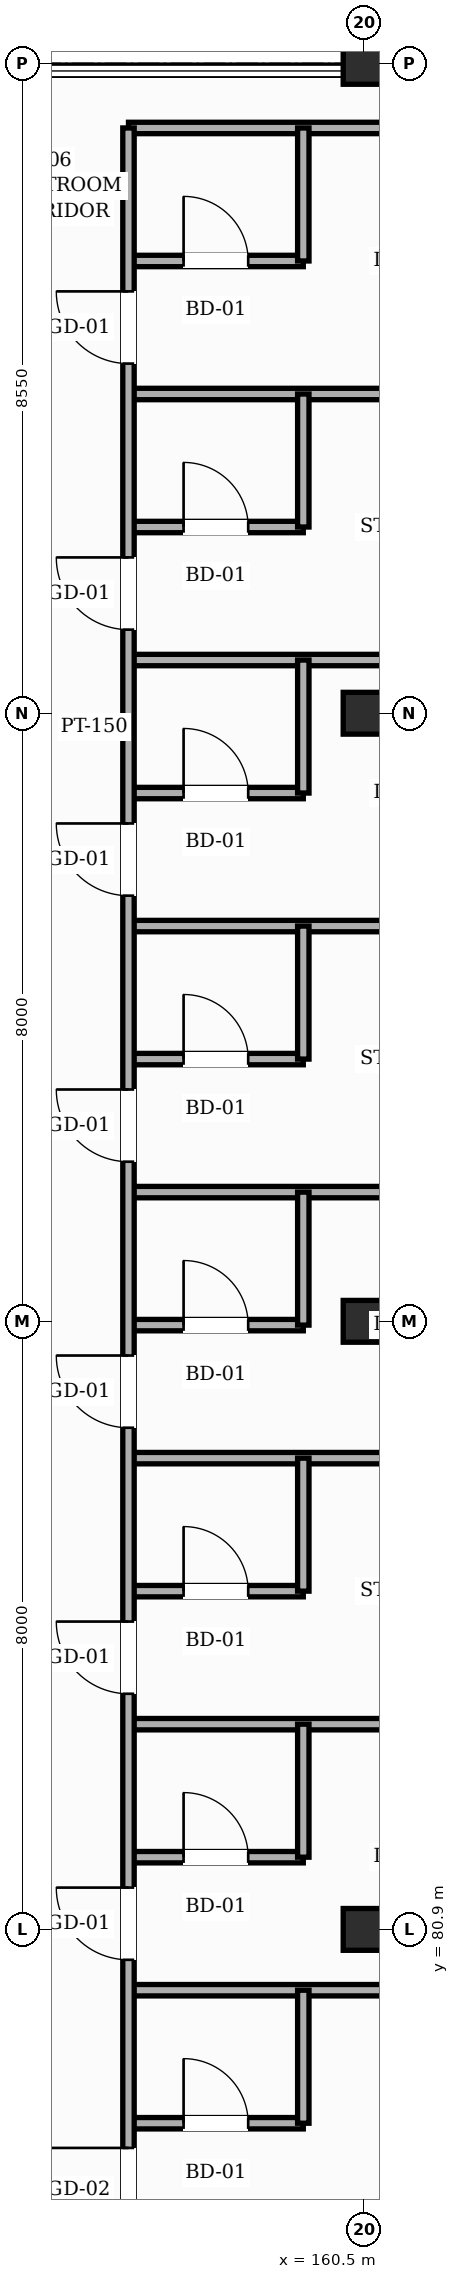
"""IFC4 building model, lengths in metres.
Left out: names, types, materials, properties, quantities, classifications, styles, units other than length and angle.
Written with IfcOpenShell. Run it as: python <this file> out.ifc"""

import sys

from ifc_helpers import new_model, si_unit, direction, frame, frame_2d, origin, origin_2d, place, context, subcontext, project, spatial, rectangle, hollow_rectangle, extrude, element, fill, save


model = new_model("IFC4")
c1 = context("Model", 3, precision=1e-05, world=origin(), true_north=direction((0.0, 1.0)))
c2 = subcontext(c1, "Body", "Model", "MODEL_VIEW")
j1 = project(units=[si_unit("LENGTHUNIT", "METRE"), si_unit("PLANEANGLEUNIT", "RADIAN")], contexts=[c1])
p1 = place(None, origin())
s1 = spatial("IfcSite", under=j1, at=p1, CompositionType="ELEMENT")
p2 = place(p1, origin())
s2 = spatial("IfcBuilding", under=s1, at=p2, CompositionType="ELEMENT")
p3 = place(p2, frame((0.0, 0.0, 28.2)))
s3 = spatial("IfcBuildingStorey", under=s2, at=p3, CompositionType="ELEMENT", Elevation=28.2)
for number, where, z_axis, x_axis in (
    (1, (160.5, 80.9, 0.0), (0.0, 0.0, 1.0), (1.0, 0.0, 0.0)),
    (2, (160.5, 88.9, 0.0), (0.0, 0.0, 1.0), (1.0, 0.0, 0.0)),
    (3, (160.5, 96.9, 0.0), (0.0, 0.0, 1.0), (1.0, 0.0, 0.0)),
):
    element("IfcColumn", number, at=place(p3, frame(where, z_axis=z_axis, x_axis=x_axis)), inside=s3, PredefinedType="COLUMN", context=c2, shape_type="SweptSolid", body=[
        extrude(hollow_rectangle(XDim=0.55, YDim=0.55, WallThickness=0.022, InnerFilletRadius=0.022, OuterFilletRadius=0.044, at=origin_2d()), origin(), (0.0, 0.0, 1.0), 3.6),
    ])
p4 = place(p3, frame((160.5, 105.45, 0.0), z_axis=(0.0, 0.0, 1.0), x_axis=(1.0, 0.0, 0.0)))
e4 = element("IfcColumn", 4, at=p4, inside=s3, PredefinedType="COLUMN", context=c2, shape_type="SweptSolid", body=[
    extrude(hollow_rectangle(XDim=0.55, YDim=0.55, WallThickness=0.022, InnerFilletRadius=0.022, OuterFilletRadius=0.044, at=origin_2d()), origin(), (0.0, 0.0, 1.0), 3.38),
])
p5 = place(p3, frame((157.4, 78.35, 0.0), z_axis=(0.0, 0.0, 1.0), x_axis=(1.0, 0.0, 0.0)))
e5 = element("IfcWall", 5, at=p5, inside=s3, PredefinedType="PARTITIONING", context=c2, shape_type="SweptSolid", body=[
    extrude(rectangle(XDim=2.3, YDim=0.15, at=frame_2d((1.15, 0.0))), origin(), (0.0, 0.0, 1.0), 3.365),
])
p6 = place(p5, frame((0.725, 0.0, 0.0)))
e6 = element("IfcOpeningElement", 6, at=p6, cuts=e5, PredefinedType="OPENING", context=c2, shape_type="SweptSolid", body=[
    extrude(rectangle(XDim=0.85, YDim=2.1, at=frame_2d((0.425, 1.05))), frame((0.0, 0.085, 0.0), z_axis=(0.0, -1.0, 0.0), x_axis=(1.0, 0.0, 0.0)), (0.0, 0.0, 1.0), 0.17),
])
p7 = place(p3, frame((157.4, 80.1, 0.0), z_axis=(0.0, 0.0, 1.0), x_axis=(1.0, 0.0, 0.0)))
e7 = element("IfcWall", 7, at=p7, inside=s3, PredefinedType="PARTITIONING", context=c2, shape_type="SweptSolid", body=[
    extrude(rectangle(XDim=9.8, YDim=0.15, at=frame_2d((4.9, 0.0))), origin(), (0.0, 0.0, 1.0), 3.365),
])
p8 = place(p3, frame((157.4, 81.85, 0.0), z_axis=(0.0, 0.0, 1.0), x_axis=(1.0, 0.0, 0.0)))
e8 = element("IfcWall", 8, at=p8, inside=s3, PredefinedType="PARTITIONING", context=c2, shape_type="SweptSolid", body=[
    extrude(rectangle(XDim=2.3, YDim=0.15, at=frame_2d((1.15, 0.0))), origin(), (0.0, 0.0, 1.0), 3.365),
])
p9 = place(p8, frame((0.725, 0.0, 0.0)))
e9 = element("IfcOpeningElement", 9, at=p9, cuts=e8, PredefinedType="OPENING", context=c2, shape_type="SweptSolid", body=[
    extrude(rectangle(XDim=0.85, YDim=2.1, at=frame_2d((0.425, 1.05))), frame((0.0, 0.085, 0.0), z_axis=(0.0, -1.0, 0.0), x_axis=(1.0, 0.0, 0.0)), (0.0, 0.0, 1.0), 0.17),
])
p10 = place(p3, frame((157.4, 83.6, 0.0), z_axis=(0.0, 0.0, 1.0), x_axis=(1.0, 0.0, 0.0)))
e10 = element("IfcWall", 10, at=p10, inside=s3, PredefinedType="PARTITIONING", context=c2, shape_type="SweptSolid", body=[
    extrude(rectangle(XDim=9.8, YDim=0.15, at=frame_2d((4.9, 0.0))), origin(), (0.0, 0.0, 1.0), 3.365),
])
p11 = place(p3, frame((157.4, 85.35, 0.0), z_axis=(0.0, 0.0, 1.0), x_axis=(1.0, 0.0, 0.0)))
e11 = element("IfcWall", 11, at=p11, inside=s3, PredefinedType="PARTITIONING", context=c2, shape_type="SweptSolid", body=[
    extrude(rectangle(XDim=2.3, YDim=0.15, at=frame_2d((1.15, 0.0))), origin(), (0.0, 0.0, 1.0), 3.365),
])
p12 = place(p11, frame((0.725, 0.0, 0.0)))
e12 = element("IfcOpeningElement", 12, at=p12, cuts=e11, PredefinedType="OPENING", context=c2, shape_type="SweptSolid", body=[
    extrude(rectangle(XDim=0.85, YDim=2.1, at=frame_2d((0.425, 1.05))), frame((0.0, 0.085, 0.0), z_axis=(0.0, -1.0, 0.0), x_axis=(1.0, 0.0, 0.0)), (0.0, 0.0, 1.0), 0.17),
])
p13 = place(p3, frame((157.4, 87.1, 0.0), z_axis=(0.0, 0.0, 1.0), x_axis=(1.0, 0.0, 0.0)))
e13 = element("IfcWall", 13, at=p13, inside=s3, PredefinedType="PARTITIONING", context=c2, shape_type="SweptSolid", body=[
    extrude(rectangle(XDim=9.8, YDim=0.15, at=frame_2d((4.9, 0.0))), origin(), (0.0, 0.0, 1.0), 3.365),
])
p14 = place(p3, frame((157.4, 88.85, 0.0), z_axis=(0.0, 0.0, 1.0), x_axis=(1.0, 0.0, 0.0)))
e14 = element("IfcWall", 14, at=p14, inside=s3, PredefinedType="PARTITIONING", context=c2, shape_type="SweptSolid", body=[
    extrude(rectangle(XDim=2.3, YDim=0.15, at=frame_2d((1.15, 0.0))), origin(), (0.0, 0.0, 1.0), 2.805),
])
p15 = place(p14, frame((0.725, 0.0, 0.0)))
e15 = element("IfcOpeningElement", 15, at=p15, cuts=e14, PredefinedType="OPENING", context=c2, shape_type="SweptSolid", body=[
    extrude(rectangle(XDim=0.85, YDim=2.1, at=frame_2d((0.425, 1.05))), frame((0.0, 0.085, 0.0), z_axis=(0.0, -1.0, 0.0), x_axis=(1.0, 0.0, 0.0)), (0.0, 0.0, 1.0), 0.17),
])
p16 = place(p3, frame((157.4, 90.6, 0.0), z_axis=(0.0, 0.0, 1.0), x_axis=(1.0, 0.0, 0.0)))
e16 = element("IfcWall", 16, at=p16, inside=s3, PredefinedType="PARTITIONING", context=c2, shape_type="SweptSolid", body=[
    extrude(rectangle(XDim=9.8, YDim=0.15, at=frame_2d((4.9, 0.0))), origin(), (0.0, 0.0, 1.0), 3.365),
])
p17 = place(p3, frame((157.4, 92.35, 0.0), z_axis=(0.0, 0.0, 1.0), x_axis=(1.0, 0.0, 0.0)))
e17 = element("IfcWall", 17, at=p17, inside=s3, PredefinedType="PARTITIONING", context=c2, shape_type="SweptSolid", body=[
    extrude(rectangle(XDim=2.3, YDim=0.15, at=frame_2d((1.15, 0.0))), origin(), (0.0, 0.0, 1.0), 3.365),
])
p18 = place(p17, frame((0.725, 0.0, 0.0)))
e18 = element("IfcOpeningElement", 18, at=p18, cuts=e17, PredefinedType="OPENING", context=c2, shape_type="SweptSolid", body=[
    extrude(rectangle(XDim=0.85, YDim=2.1, at=frame_2d((0.425, 1.05))), frame((0.0, 0.085, 0.0), z_axis=(0.0, -1.0, 0.0), x_axis=(1.0, 0.0, 0.0)), (0.0, 0.0, 1.0), 0.17),
])
p19 = place(p3, frame((157.4, 94.1, 0.0), z_axis=(0.0, 0.0, 1.0), x_axis=(1.0, 0.0, 0.0)))
e19 = element("IfcWall", 19, at=p19, inside=s3, PredefinedType="PARTITIONING", context=c2, shape_type="SweptSolid", body=[
    extrude(rectangle(XDim=9.8, YDim=0.15, at=frame_2d((4.9, 0.0))), origin(), (0.0, 0.0, 1.0), 3.365),
])
p20 = place(p3, frame((157.4, 95.85, 0.0), z_axis=(0.0, 0.0, 1.0), x_axis=(1.0, 0.0, 0.0)))
e20 = element("IfcWall", 20, at=p20, inside=s3, PredefinedType="PARTITIONING", context=c2, shape_type="SweptSolid", body=[
    extrude(rectangle(XDim=2.3, YDim=0.15, at=frame_2d((1.15, 0.0))), origin(), (0.0, 0.0, 1.0), 3.365),
])
p21 = place(p20, frame((0.725, 0.0, 0.0)))
e21 = element("IfcOpeningElement", 21, at=p21, cuts=e20, PredefinedType="OPENING", context=c2, shape_type="SweptSolid", body=[
    extrude(rectangle(XDim=0.85, YDim=2.1, at=frame_2d((0.425, 1.05))), frame((0.0, 0.085, 0.0), z_axis=(0.0, -1.0, 0.0), x_axis=(1.0, 0.0, 0.0)), (0.0, 0.0, 1.0), 0.17),
])
p22 = place(p3, frame((157.4, 97.6, 0.0), z_axis=(0.0, 0.0, 1.0), x_axis=(1.0, 0.0, 0.0)))
e22 = element("IfcWall", 22, at=p22, inside=s3, PredefinedType="PARTITIONING", context=c2, shape_type="SweptSolid", body=[
    extrude(rectangle(XDim=9.8, YDim=0.15, at=frame_2d((4.9, 0.0))), origin(), (0.0, 0.0, 1.0), 3.365),
])
p23 = place(p3, frame((157.4, 99.35, 0.0), z_axis=(0.0, 0.0, 1.0), x_axis=(1.0, 0.0, 0.0)))
e23 = element("IfcWall", 23, at=p23, inside=s3, PredefinedType="PARTITIONING", context=c2, shape_type="SweptSolid", body=[
    extrude(rectangle(XDim=2.3, YDim=0.15, at=frame_2d((1.15, 0.0))), origin(), (0.0, 0.0, 1.0), 3.365),
])
p24 = place(p23, frame((0.725, 0.0, 0.0)))
e24 = element("IfcOpeningElement", 24, at=p24, cuts=e23, PredefinedType="OPENING", context=c2, shape_type="SweptSolid", body=[
    extrude(rectangle(XDim=0.85, YDim=2.1, at=frame_2d((0.425, 1.05))), frame((0.0, 0.085, 0.0), z_axis=(0.0, -1.0, 0.0), x_axis=(1.0, 0.0, 0.0)), (0.0, 0.0, 1.0), 0.17),
])
p25 = place(p3, frame((157.4, 101.1, 0.0), z_axis=(0.0, 0.0, 1.0), x_axis=(1.0, 0.0, 0.0)))
e25 = element("IfcWall", 25, at=p25, inside=s3, PredefinedType="PARTITIONING", context=c2, shape_type="SweptSolid", body=[
    extrude(rectangle(XDim=9.8, YDim=0.15, at=frame_2d((4.9, 0.0))), origin(), (0.0, 0.0, 1.0), 3.005),
])
p26 = place(p3, frame((157.4, 102.85, 0.0), z_axis=(0.0, 0.0, 1.0), x_axis=(1.0, 0.0, 0.0)))
e26 = element("IfcWall", 26, at=p26, inside=s3, PredefinedType="PARTITIONING", context=c2, shape_type="SweptSolid", body=[
    extrude(rectangle(XDim=2.3, YDim=0.15, at=frame_2d((1.15, 0.0))), origin(), (0.0, 0.0, 1.0), 3.365),
])
p27 = place(p26, frame((0.725, 0.0, 0.0)))
e27 = element("IfcOpeningElement", 27, at=p27, cuts=e26, PredefinedType="OPENING", context=c2, shape_type="SweptSolid", body=[
    extrude(rectangle(XDim=0.85, YDim=2.1, at=frame_2d((0.425, 1.05))), frame((0.0, 0.085, 0.0), z_axis=(0.0, -1.0, 0.0), x_axis=(1.0, 0.0, 0.0)), (0.0, 0.0, 1.0), 0.17),
])
p28 = place(p3, frame((157.4, 104.6, 0.0), z_axis=(0.0, 0.0, 1.0), x_axis=(1.0, 0.0, 0.0)))
e28 = element("IfcWall", 28, at=p28, inside=s3, PredefinedType="PARTITIONING", context=c2, shape_type="SweptSolid", body=[
    extrude(rectangle(XDim=9.8, YDim=0.15, at=frame_2d((4.9, 0.0))), origin(), (0.0, 0.0, 1.0), 3.365),
])
p29 = place(p3, frame((157.4, 76.6, 0.0), z_axis=(0.0, 0.0, 1.0), x_axis=(0.0, 1.0, 0.0)))
e29 = element("IfcWall", 29, at=p29, inside=s3, PredefinedType="PARTITIONING", context=c2, shape_type="SweptSolid", body=[
    extrude(rectangle(XDim=28.0, YDim=0.15, at=frame_2d((14.0, 0.0))), origin(), (0.0, 0.0, 1.0), 3.365),
])
p30 = place(p29, frame((0.325, 0.0, 0.0)))
e30 = element("IfcOpeningElement", 30, at=p30, cuts=e29, PredefinedType="OPENING", context=c2, shape_type="SweptSolid", body=[
    extrude(rectangle(XDim=1.1, YDim=2.2, at=frame_2d((0.55, 1.1))), frame((0.0, 0.085, 0.0), z_axis=(0.0, -1.0, 0.0), x_axis=(1.0, 0.0, 0.0)), (0.0, 0.0, 1.0), 0.17),
])
p31 = place(p29, frame((3.9, 0.0, 0.0)))
e31 = element("IfcOpeningElement", 31, at=p31, cuts=e29, PredefinedType="OPENING", context=c2, shape_type="SweptSolid", body=[
    extrude(rectangle(XDim=0.95, YDim=2.15, at=frame_2d((0.475, 1.075))), frame((0.0, 0.085, 0.0), z_axis=(0.0, -1.0, 0.0), x_axis=(1.0, 0.0, 0.0)), (0.0, 0.0, 1.0), 0.17),
])
p32 = place(p29, frame((7.4, 0.0, 0.0)))
e32 = element("IfcOpeningElement", 32, at=p32, cuts=e29, PredefinedType="OPENING", context=c2, shape_type="SweptSolid", body=[
    extrude(rectangle(XDim=0.95, YDim=2.15, at=frame_2d((0.475, 1.075))), frame((0.0, 0.085, 0.0), z_axis=(0.0, -1.0, 0.0), x_axis=(1.0, 0.0, 0.0)), (0.0, 0.0, 1.0), 0.17),
])
p33 = place(p29, frame((10.9, 0.0, 0.0)))
e33 = element("IfcOpeningElement", 33, at=p33, cuts=e29, PredefinedType="OPENING", context=c2, shape_type="SweptSolid", body=[
    extrude(rectangle(XDim=0.95, YDim=2.15, at=frame_2d((0.475, 1.075))), frame((0.0, 0.085, 0.0), z_axis=(0.0, -1.0, 0.0), x_axis=(1.0, 0.0, 0.0)), (0.0, 0.0, 1.0), 0.17),
])
p34 = place(p29, frame((14.4, 0.0, 0.0)))
e34 = element("IfcOpeningElement", 34, at=p34, cuts=e29, PredefinedType="OPENING", context=c2, shape_type="SweptSolid", body=[
    extrude(rectangle(XDim=0.95, YDim=2.15, at=frame_2d((0.475, 1.075))), frame((0.0, 0.085, 0.0), z_axis=(0.0, -1.0, 0.0), x_axis=(1.0, 0.0, 0.0)), (0.0, 0.0, 1.0), 0.17),
])
p35 = place(p29, frame((17.9, 0.0, 0.0)))
e35 = element("IfcOpeningElement", 35, at=p35, cuts=e29, PredefinedType="OPENING", context=c2, shape_type="SweptSolid", body=[
    extrude(rectangle(XDim=0.95, YDim=2.15, at=frame_2d((0.475, 1.075))), frame((0.0, 0.085, 0.0), z_axis=(0.0, -1.0, 0.0), x_axis=(1.0, 0.0, 0.0)), (0.0, 0.0, 1.0), 0.17),
])
p36 = place(p29, frame((21.4, 0.0, 0.0)))
e36 = element("IfcOpeningElement", 36, at=p36, cuts=e29, PredefinedType="OPENING", context=c2, shape_type="SweptSolid", body=[
    extrude(rectangle(XDim=0.95, YDim=2.15, at=frame_2d((0.475, 1.075))), frame((0.0, 0.085, 0.0), z_axis=(0.0, -1.0, 0.0), x_axis=(1.0, 0.0, 0.0)), (0.0, 0.0, 1.0), 0.17),
])
p37 = place(p29, frame((24.9, 0.0, 0.0)))
e37 = element("IfcOpeningElement", 37, at=p37, cuts=e29, PredefinedType="OPENING", context=c2, shape_type="SweptSolid", body=[
    extrude(rectangle(XDim=0.95, YDim=2.15, at=frame_2d((0.475, 1.075))), frame((0.0, 0.085, 0.0), z_axis=(0.0, -1.0, 0.0), x_axis=(1.0, 0.0, 0.0)), (0.0, 0.0, 1.0), 0.17),
])
for number, where, z_axis, x_axis in (
    (38, (159.7, 78.35, 0.0), (0.0, 0.0, 1.0), (0.0, 1.0, 0.0)),
    (39, (159.7, 81.85, 0.0), (0.0, 0.0, 1.0), (0.0, 1.0, 0.0)),
    (40, (159.7, 85.35, 0.0), (0.0, 0.0, 1.0), (0.0, 1.0, 0.0)),
    (41, (159.7, 88.85, 0.0), (0.0, 0.0, 1.0), (0.0, 1.0, 0.0)),
    (42, (159.7, 92.35, 0.0), (0.0, 0.0, 1.0), (0.0, 1.0, 0.0)),
    (43, (159.7, 95.85, 0.0), (0.0, 0.0, 1.0), (0.0, 1.0, 0.0)),
    (44, (159.7, 99.35, 0.0), (0.0, 0.0, 1.0), (0.0, 1.0, 0.0)),
    (45, (159.7, 102.85, 0.0), (0.0, 0.0, 1.0), (0.0, 1.0, 0.0)),
):
    element("IfcWall", number, at=place(p3, frame(where, z_axis=z_axis, x_axis=x_axis)), inside=s3, PredefinedType="PARTITIONING", context=c2, shape_type="SweptSolid", body=[
        extrude(rectangle(XDim=1.75, YDim=0.15, at=frame_2d((0.875, 0.0))), origin(), (0.0, 0.0, 1.0), 3.365),
    ])
p38 = place(p30, origin())
e46 = element("IfcDoor", 46, at=p38, inside=s3, OperationType="SINGLE_SWING_RIGHT", PredefinedType="DOOR", context=c2, shape_type="SweptSolid", body=[
    extrude(rectangle(XDim=1.1, YDim=2.2, at=frame_2d((0.55, 1.1))), frame((0.0, 0.025, 0.0), z_axis=(0.0, -1.0, 0.0), x_axis=(1.0, 0.0, 0.0)), (0.0, 0.0, 1.0), 0.05),
])
fill(e30, e46)
p39 = place(p6, origin())
e47 = element("IfcDoor", 47, at=p39, inside=s3, OperationType="SINGLE_SWING_LEFT", PredefinedType="DOOR", context=c2, shape_type="SweptSolid", body=[
    extrude(rectangle(XDim=0.85, YDim=2.1, at=frame_2d((0.425, 1.05))), frame((0.0, 0.025, 0.0), z_axis=(0.0, -1.0, 0.0), x_axis=(1.0, 0.0, 0.0)), (0.0, 0.0, 1.0), 0.05),
])
fill(e6, e47)
p40 = place(p31, origin())
e48 = element("IfcDoor", 48, at=p40, inside=s3, OperationType="SINGLE_SWING_RIGHT", PredefinedType="DOOR", context=c2, shape_type="SweptSolid", body=[
    extrude(rectangle(XDim=0.95, YDim=2.15, at=frame_2d((0.475, 1.075))), frame((0.0, 0.025, 0.0), z_axis=(0.0, -1.0, 0.0), x_axis=(1.0, 0.0, 0.0)), (0.0, 0.0, 1.0), 0.05),
])
fill(e31, e48)
p41 = place(p9, origin())
e49 = element("IfcDoor", 49, at=p41, inside=s3, OperationType="SINGLE_SWING_LEFT", PredefinedType="DOOR", context=c2, shape_type="SweptSolid", body=[
    extrude(rectangle(XDim=0.85, YDim=2.1, at=frame_2d((0.425, 1.05))), frame((0.0, 0.025, 0.0), z_axis=(0.0, -1.0, 0.0), x_axis=(1.0, 0.0, 0.0)), (0.0, 0.0, 1.0), 0.05),
])
fill(e9, e49)
p42 = place(p32, origin())
e50 = element("IfcDoor", 50, at=p42, inside=s3, OperationType="SINGLE_SWING_RIGHT", PredefinedType="DOOR", context=c2, shape_type="SweptSolid", body=[
    extrude(rectangle(XDim=0.95, YDim=2.15, at=frame_2d((0.475, 1.075))), frame((0.0, 0.025, 0.0), z_axis=(0.0, -1.0, 0.0), x_axis=(1.0, 0.0, 0.0)), (0.0, 0.0, 1.0), 0.05),
])
fill(e32, e50)
p43 = place(p12, origin())
e51 = element("IfcDoor", 51, at=p43, inside=s3, OperationType="SINGLE_SWING_LEFT", PredefinedType="DOOR", context=c2, shape_type="SweptSolid", body=[
    extrude(rectangle(XDim=0.85, YDim=2.1, at=frame_2d((0.425, 1.05))), frame((0.0, 0.025, 0.0), z_axis=(0.0, -1.0, 0.0), x_axis=(1.0, 0.0, 0.0)), (0.0, 0.0, 1.0), 0.05),
])
fill(e12, e51)
p44 = place(p33, origin())
e52 = element("IfcDoor", 52, at=p44, inside=s3, OperationType="SINGLE_SWING_RIGHT", PredefinedType="DOOR", context=c2, shape_type="SweptSolid", body=[
    extrude(rectangle(XDim=0.95, YDim=2.15, at=frame_2d((0.475, 1.075))), frame((0.0, 0.025, 0.0), z_axis=(0.0, -1.0, 0.0), x_axis=(1.0, 0.0, 0.0)), (0.0, 0.0, 1.0), 0.05),
])
fill(e33, e52)
p45 = place(p15, origin())
e53 = element("IfcDoor", 53, at=p45, inside=s3, OperationType="SINGLE_SWING_LEFT", PredefinedType="DOOR", context=c2, shape_type="SweptSolid", body=[
    extrude(rectangle(XDim=0.85, YDim=2.1, at=frame_2d((0.425, 1.05))), frame((0.0, 0.025, 0.0), z_axis=(0.0, -1.0, 0.0), x_axis=(1.0, 0.0, 0.0)), (0.0, 0.0, 1.0), 0.05),
])
fill(e15, e53)
p46 = place(p34, origin())
e54 = element("IfcDoor", 54, at=p46, inside=s3, OperationType="SINGLE_SWING_RIGHT", PredefinedType="DOOR", context=c2, shape_type="SweptSolid", body=[
    extrude(rectangle(XDim=0.95, YDim=2.15, at=frame_2d((0.475, 1.075))), frame((0.0, 0.025, 0.0), z_axis=(0.0, -1.0, 0.0), x_axis=(1.0, 0.0, 0.0)), (0.0, 0.0, 1.0), 0.05),
])
fill(e34, e54)
p47 = place(p18, origin())
e55 = element("IfcDoor", 55, at=p47, inside=s3, OperationType="SINGLE_SWING_LEFT", PredefinedType="DOOR", context=c2, shape_type="SweptSolid", body=[
    extrude(rectangle(XDim=0.85, YDim=2.1, at=frame_2d((0.425, 1.05))), frame((0.0, 0.025, 0.0), z_axis=(0.0, -1.0, 0.0), x_axis=(1.0, 0.0, 0.0)), (0.0, 0.0, 1.0), 0.05),
])
fill(e18, e55)
p48 = place(p35, origin())
e56 = element("IfcDoor", 56, at=p48, inside=s3, OperationType="SINGLE_SWING_RIGHT", PredefinedType="DOOR", context=c2, shape_type="SweptSolid", body=[
    extrude(rectangle(XDim=0.95, YDim=2.15, at=frame_2d((0.475, 1.075))), frame((0.0, 0.025, 0.0), z_axis=(0.0, -1.0, 0.0), x_axis=(1.0, 0.0, 0.0)), (0.0, 0.0, 1.0), 0.05),
])
fill(e35, e56)
p49 = place(p21, origin())
e57 = element("IfcDoor", 57, at=p49, inside=s3, OperationType="SINGLE_SWING_LEFT", PredefinedType="DOOR", context=c2, shape_type="SweptSolid", body=[
    extrude(rectangle(XDim=0.85, YDim=2.1, at=frame_2d((0.425, 1.05))), frame((0.0, 0.025, 0.0), z_axis=(0.0, -1.0, 0.0), x_axis=(1.0, 0.0, 0.0)), (0.0, 0.0, 1.0), 0.05),
])
fill(e21, e57)
p50 = place(p36, origin())
e58 = element("IfcDoor", 58, at=p50, inside=s3, OperationType="SINGLE_SWING_RIGHT", PredefinedType="DOOR", context=c2, shape_type="SweptSolid", body=[
    extrude(rectangle(XDim=0.95, YDim=2.15, at=frame_2d((0.475, 1.075))), frame((0.0, 0.025, 0.0), z_axis=(0.0, -1.0, 0.0), x_axis=(1.0, 0.0, 0.0)), (0.0, 0.0, 1.0), 0.05),
])
fill(e36, e58)
p51 = place(p24, origin())
e59 = element("IfcDoor", 59, at=p51, inside=s3, OperationType="SINGLE_SWING_LEFT", PredefinedType="DOOR", context=c2, shape_type="SweptSolid", body=[
    extrude(rectangle(XDim=0.85, YDim=2.1, at=frame_2d((0.425, 1.05))), frame((0.0, 0.025, 0.0), z_axis=(0.0, -1.0, 0.0), x_axis=(1.0, 0.0, 0.0)), (0.0, 0.0, 1.0), 0.05),
])
fill(e24, e59)
p52 = place(p37, origin())
e60 = element("IfcDoor", 60, at=p52, inside=s3, OperationType="SINGLE_SWING_RIGHT", PredefinedType="DOOR", context=c2, shape_type="SweptSolid", body=[
    extrude(rectangle(XDim=0.95, YDim=2.15, at=frame_2d((0.475, 1.075))), frame((0.0, 0.025, 0.0), z_axis=(0.0, -1.0, 0.0), x_axis=(1.0, 0.0, 0.0)), (0.0, 0.0, 1.0), 0.05),
])
fill(e37, e60)
p53 = place(p27, origin())
e61 = element("IfcDoor", 61, at=p53, inside=s3, OperationType="SINGLE_SWING_LEFT", PredefinedType="DOOR", context=c2, shape_type="SweptSolid", body=[
    extrude(rectangle(XDim=0.85, YDim=2.1, at=frame_2d((0.425, 1.05))), frame((0.0, 0.025, 0.0), z_axis=(0.0, -1.0, 0.0), x_axis=(1.0, 0.0, 0.0)), (0.0, 0.0, 1.0), 0.05),
])
fill(e27, e61)
save(model, sys.argv[1])
